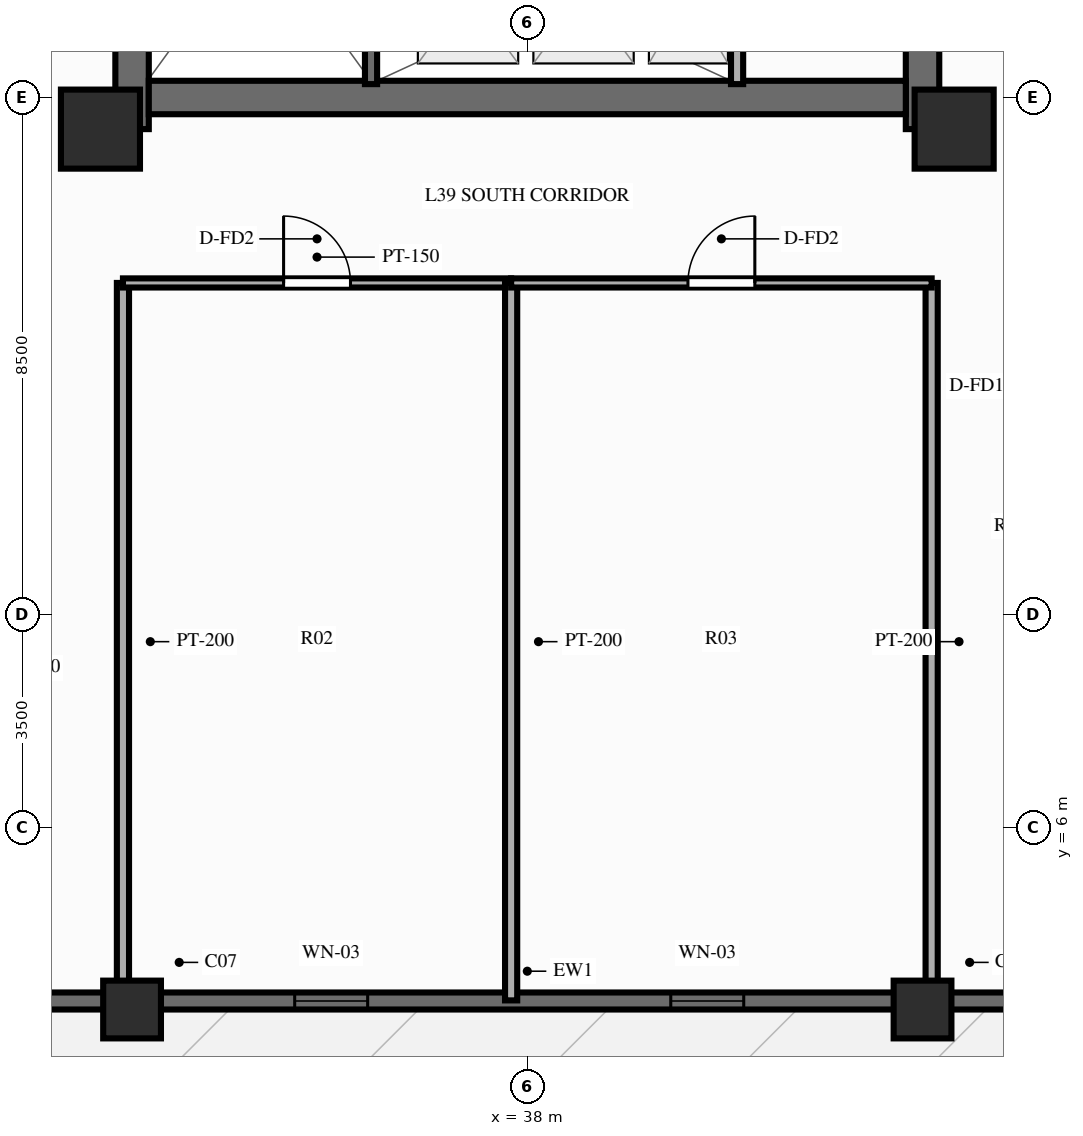
"""IFC4 building model, lengths in metres.
Left out: names, types, materials, properties, quantities, classifications, styles, units other than length and angle.
Written with IfcOpenShell. Run it as: python <this file> out.ifc"""

import sys

from ifc_helpers import new_model, si_unit, direction, frame, frame_2d, origin, origin_2d, place, context, subcontext, project, spatial, rectangle, extrude, source, transform, mapped, element, fill, save


model = new_model("IFC4")
c1 = context("Model", 3, precision=1e-05, world=origin(), true_north=direction((0.0, 1.0)))
c2 = subcontext(c1, "Body", "Model", "MODEL_VIEW")
j1 = project(units=[si_unit("LENGTHUNIT", "METRE"), si_unit("PLANEANGLEUNIT", "RADIAN")], contexts=[c1])
p1 = place(None, origin())
s1 = spatial("IfcSite", under=j1, at=p1, CompositionType="ELEMENT")
p2 = place(p1, origin())
s2 = spatial("IfcBuilding", under=s1, at=p2, CompositionType="ELEMENT")
p3 = place(p2, frame((0.0, 0.0, 122.85)))
s3 = spatial("IfcBuildingStorey", under=s2, at=p3, CompositionType="ELEMENT", Elevation=122.85)
p4 = place(p3, frame((31.5, 17.48, 0.0), z_axis=(0.0, 0.0, 1.0), x_axis=(0.0, 1.0, 0.0)))
e1 = element("IfcWall", 1, at=p4, inside=s3, PredefinedType="SHEAR", context=c2, shape_type="SweptSolid", body=[
    extrude(rectangle(XDim=19.04, YDim=0.55, at=frame_2d((9.52, 0.0))), origin(), (0.0, 0.0, 1.0), 3.9),
])
p5 = place(p4, frame((6.32, 0.0, 0.0)))
e2 = element("IfcOpeningElement", 2, at=p5, cuts=e1, PredefinedType="OPENING", context=c2, shape_type="SweptSolid", body=[
    extrude(rectangle(XDim=1.1, YDim=2.15, at=frame_2d((0.55, 1.075))), frame((0.0, 0.287, 0.0), z_axis=(0.0, -1.0, 0.0), x_axis=(1.0, 0.0, 0.0)), (0.0, 0.0, 1.0), 0.574),
])
p6 = place(p3, frame((44.5, 17.48, 0.0), z_axis=(0.0, 0.0, 1.0), x_axis=(0.0, 1.0, 0.0)))
e3 = element("IfcWall", 3, at=p6, inside=s3, PredefinedType="SHEAR", context=c2, shape_type="SweptSolid", body=[
    extrude(rectangle(XDim=19.04, YDim=0.55, at=frame_2d((9.52, 0.0))), origin(), (0.0, 0.0, 1.0), 3.9),
])
p7 = place(p6, frame((12.67, 0.0, 0.0), z_axis=(0.0, 0.0, 1.0), x_axis=(-1.0, 0.0, 0.0)))
e4 = element("IfcOpeningElement", 4, at=p7, cuts=e3, PredefinedType="OPENING", context=c2, shape_type="SweptSolid", body=[
    extrude(rectangle(XDim=1.1, YDim=2.15, at=frame_2d((0.55, 1.075))), frame((0.0, 0.287, 0.0), z_axis=(0.0, -1.0, 0.0), x_axis=(1.0, 0.0, 0.0)), (0.0, 0.0, 1.0), 0.574),
])
p8 = place(p3, frame((31.775, 18.0, 0.0), z_axis=(0.0, 0.0, 1.0), x_axis=(1.0, 0.0, 0.0)))
e5 = element("IfcWall", 5, at=p8, inside=s3, PredefinedType="SHEAR", context=c2, shape_type="SweptSolid", body=[
    extrude(rectangle(XDim=12.45, YDim=0.55, at=frame_2d((6.225, 0.0))), origin(), (0.0, 0.0, 1.0), 3.9),
])
m1 = source(origin(), c2, "Body", "SweptSolid", [
    extrude(rectangle(XDim=1.3, YDim=1.3, at=origin_2d()), origin(), (0.0, 0.0, 1.0), 3.9),
])
for number, where, z_axis, x_axis in (
    (6, (30.98, 17.48, 0.0), (0.0, 0.0, 1.0), (1.0, 0.0, 0.0)),
    (7, (45.02, 17.48, 0.0), (0.0, 0.0, 1.0), (1.0, 0.0, 0.0)),
):
    element("IfcColumn", number, at=place(p3, frame(where, z_axis=z_axis, x_axis=x_axis)), inside=s3, PredefinedType="COLUMN", context=c2, shape_type="MappedRepresentation", body=[
        mapped(m1, transform((0.0, 0.0, 0.0), scale=1.0)),
    ])
m2 = source(origin(), c2, "Body", "SweptSolid", [
    extrude(rectangle(XDim=0.95, YDim=0.95, at=origin_2d()), origin(), (0.0, 0.0, 1.0), 3.9),
])
for number, where, z_axis, x_axis in (
    (8, (31.5, 3.0, 0.0), (0.0, 0.0, 1.0), (1.0, 0.0, 0.0)),
    (9, (44.5, 3.0, 0.0), (0.0, 0.0, 1.0), (1.0, 0.0, 0.0)),
):
    element("IfcColumn", number, at=place(p3, frame(where, z_axis=z_axis, x_axis=x_axis)), inside=s3, PredefinedType="COLUMN", context=c2, shape_type="MappedRepresentation", body=[
        mapped(m2, transform((0.0, 0.0, 0.0), scale=1.0)),
    ])
p9 = place(p3, frame((16.2, 3.14, 0.0), z_axis=(0.0, 0.0, 1.0), x_axis=(1.0, 0.0, 0.0)))
e10 = element("IfcWall", 10, at=p9, inside=s3, PredefinedType="SOLIDWALL", context=c2, shape_type="SweptSolid", body=[
    extrude(rectangle(XDim=43.6, YDim=0.28, at=frame_2d((21.8, 0.0))), origin(), (0.0, 0.0, 1.0), 2.24),
])
p10 = place(p9, frame((8.2, 0.0, 0.0), z_axis=(0.0, 0.0, 1.0), x_axis=(-1.0, 0.0, 0.0)))
e11 = element("IfcOpeningElement", 11, at=p10, cuts=e10, PredefinedType="OPENING", context=c2, shape_type="SweptSolid", body=[
    extrude(rectangle(XDim=1.1, YDim=2.15, at=frame_2d((0.55, 1.075))), frame((0.0, 0.152, 0.0), z_axis=(0.0, -1.0, 0.0), x_axis=(1.0, 0.0, 0.0)), (0.0, 0.0, 1.0), 0.304),
])
p11 = place(p9, frame((17.975, 0.0, 0.25)))
e12 = element("IfcOpeningElement", 12, at=p11, cuts=e10, PredefinedType="OPENING", context=c2, shape_type="SweptSolid", body=[
    extrude(rectangle(XDim=1.2, YDim=1.5, at=frame_2d((0.6, 0.75))), frame((0.0, 0.152, 0.0), z_axis=(0.0, -1.0, 0.0), x_axis=(1.0, 0.0, 0.0)), (0.0, 0.0, 1.0), 0.304),
])
p12 = place(p9, frame((24.159, 0.0, 0.25)))
e13 = element("IfcOpeningElement", 13, at=p12, cuts=e10, PredefinedType="OPENING", context=c2, shape_type="SweptSolid", body=[
    extrude(rectangle(XDim=1.2, YDim=1.5, at=frame_2d((0.6, 0.75))), frame((0.0, 0.152, 0.0), z_axis=(0.0, -1.0, 0.0), x_axis=(1.0, 0.0, 0.0)), (0.0, 0.0, 1.0), 0.304),
])
p13 = place(p9, frame((35.35, 0.0, 0.25)))
e14 = element("IfcOpeningElement", 14, at=p13, cuts=e10, PredefinedType="OPENING", context=c2, shape_type="SweptSolid", body=[
    extrude(rectangle(XDim=1.2, YDim=1.5, at=frame_2d((0.6, 0.75))), frame((0.0, 0.152, 0.0), z_axis=(0.0, -1.0, 0.0), x_axis=(1.0, 0.0, 0.0)), (0.0, 0.0, 1.0), 0.304),
])
p14 = place(p3, frame((41.45, 18.22, 0.0), z_axis=(0.0, 0.0, 1.0), x_axis=(0.0, 1.0, 0.0)))
e15 = element("IfcWall", 15, at=p14, inside=s3, PredefinedType="PARTITIONING", context=c2, shape_type="SweptSolid", body=[
    extrude(rectangle(XDim=2.96, YDim=0.2, at=frame_2d((1.48, 0.0))), origin(), (0.0, 0.0, 1.0), 3.56),
])
p15 = place(p3, frame((35.43, 18.22, 0.0), z_axis=(0.0, 0.0, 1.0), x_axis=(0.0, 1.0, 0.0)))
e16 = element("IfcWall", 16, at=p15, inside=s3, PredefinedType="SOLIDWALL", context=c2, shape_type="SweptSolid", body=[
    extrude(rectangle(XDim=7.22, YDim=0.2, at=frame_2d((3.61, 0.0))), origin(), (0.0, 0.0, 1.0), 3.69),
])
p16 = place(p15, frame((6.68, 0.0, 0.0), z_axis=(0.0, 0.0, 1.0), x_axis=(-1.0, 0.0, 0.0)))
e17 = element("IfcOpeningElement", 17, at=p16, cuts=e16, PredefinedType="OPENING", context=c2, shape_type="SweptSolid", body=[
    extrude(rectangle(XDim=1.1, YDim=2.15, at=frame_2d((0.55, 1.075))), frame((0.0, 0.112, 0.0), z_axis=(0.0, -1.0, 0.0), x_axis=(1.0, 0.0, 0.0)), (0.0, 0.0, 1.0), 0.224),
])
for number, where, z_axis, x_axis in (
    (18, (31.35, 14.95, 0.0), (0.0, 0.0, 1.0), (0.0, -1.0, 0.0)),
    (19, (44.65, 14.95, 0.0), (0.0, 0.0, 1.0), (0.0, -1.0, 0.0)),
):
    element("IfcWall", number, at=place(p3, frame(where, z_axis=z_axis, x_axis=x_axis)), inside=s3, PredefinedType="PARTITIONING", context=c2, shape_type="SweptSolid", body=[
        extrude(rectangle(XDim=11.8, YDim=0.2, at=frame_2d((5.9, 0.0))), origin(), (0.0, 0.0, 1.0), 2.24),
    ])
p17 = place(p3, frame((31.35, 14.95, 0.0), z_axis=(0.0, 0.0, 1.0), x_axis=(1.0, 0.0, 0.0)))
e20 = element("IfcWall", 20, at=p17, inside=s3, PredefinedType="PARTITIONING", context=c2, shape_type="SweptSolid", body=[
    extrude(rectangle(XDim=6.384, YDim=0.15, at=frame_2d((3.192, 0.0))), origin(), (0.0, 0.0, 1.0), 3.56),
])
p18 = place(p17, frame((2.642, 0.0, 0.0)))
e21 = element("IfcOpeningElement", 21, at=p18, cuts=e20, PredefinedType="OPENING", context=c2, shape_type="SweptSolid", body=[
    extrude(rectangle(XDim=1.1, YDim=2.15, at=frame_2d((0.55, 1.075))), frame((0.0, 0.087, 0.0), z_axis=(0.0, -1.0, 0.0), x_axis=(1.0, 0.0, 0.0)), (0.0, 0.0, 1.0), 0.174),
])
p19 = place(p3, frame((37.734, 14.95, 0.0), z_axis=(0.0, 0.0, 1.0), x_axis=(0.0, -1.0, 0.0)))
e22 = element("IfcWall", 22, at=p19, inside=s3, PredefinedType="PARTITIONING", context=c2, shape_type="SweptSolid", body=[
    extrude(rectangle(XDim=11.8, YDim=0.2, at=frame_2d((5.9, 0.0))), origin(), (0.0, 0.0, 1.0), 3.56),
])
p20 = place(p3, frame((37.734, 14.95, 0.0), z_axis=(0.0, 0.0, 1.0), x_axis=(1.0, 0.0, 0.0)))
e23 = element("IfcWall", 23, at=p20, inside=s3, PredefinedType="PARTITIONING", context=c2, shape_type="SweptSolid", body=[
    extrude(rectangle(XDim=6.916, YDim=0.15, at=frame_2d((3.458, 0.0))), origin(), (0.0, 0.0, 1.0), 3.56),
])
p21 = place(p20, frame((2.908, 0.0, 0.0)))
e24 = element("IfcOpeningElement", 24, at=p21, cuts=e23, PredefinedType="OPENING", context=c2, shape_type="SweptSolid", body=[
    extrude(rectangle(XDim=1.1, YDim=2.15, at=frame_2d((0.55, 1.075))), frame((0.0, 0.087, 0.0), z_axis=(0.0, -1.0, 0.0), x_axis=(1.0, 0.0, 0.0)), (0.0, 0.0, 1.0), 0.174),
])
m3 = source(origin(), c2, "Body", "SweptSolid", [
    extrude(rectangle(XDim=1.2, YDim=1.5, at=frame_2d((0.6, 0.75))), frame((0.0, 0.03, 0.0), z_axis=(0.0, -1.0, 0.0), x_axis=(1.0, 0.0, 0.0)), (0.0, 0.0, 1.0), 0.06),
])
p22 = place(p11, origin())
e25 = element("IfcWindow", 25, at=p22, inside=s3, PartitioningType="SINGLE_PANEL", PredefinedType="WINDOW", context=c2, shape_type="MappedRepresentation", body=[
    mapped(m3, transform((0.0, 0.0, 0.0), scale=1.0)),
])
fill(e12, e25)
p23 = place(p12, origin())
e26 = element("IfcWindow", 26, at=p23, inside=s3, PartitioningType="SINGLE_PANEL", PredefinedType="WINDOW", context=c2, shape_type="MappedRepresentation", body=[
    mapped(m3, transform((0.0, 0.0, 0.0), scale=1.0)),
])
fill(e13, e26)
m4 = source(origin(), c2, "Body", "SweptSolid", [
    extrude(rectangle(XDim=1.1, YDim=2.15, at=frame_2d((0.55, 1.075))), frame((0.0, 0.025, 0.0), z_axis=(0.0, -1.0, 0.0), x_axis=(1.0, 0.0, 0.0)), (0.0, 0.0, 1.0), 0.05),
])
p24 = place(p18, origin())
e27 = element("IfcDoor", 27, at=p24, inside=s3, OperationType="SINGLE_SWING_LEFT", PredefinedType="DOOR", context=c2, shape_type="MappedRepresentation", body=[
    mapped(m4, transform((0.0, 0.0, 0.0), scale=1.0)),
])
fill(e21, e27)
p25 = place(p21, origin())
e28 = element("IfcDoor", 28, at=p25, inside=s3, OperationType="SINGLE_SWING_RIGHT", PredefinedType="DOOR", context=c2, shape_type="MappedRepresentation", body=[
    mapped(m4, transform((0.0, 0.0, 0.0), scale=1.0)),
])
fill(e24, e28)
save(model, sys.argv[1])
